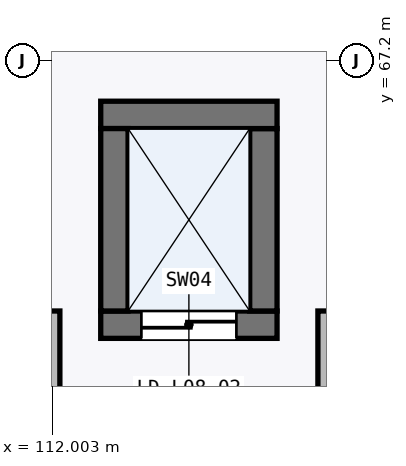
"""IFC4 building model, lengths in metres.
Left out: names, types, materials, properties, quantities, classifications, styles, units other than length and angle.
Written with IfcOpenShell. Run it as: python <this file> out.ifc"""

import sys

from ifc_helpers import new_model, si_unit, direction, frame, frame_2d, origin, place, context, subcontext, project, spatial, rectangle, extrude, element, fill, save


model = new_model("IFC4")
c1 = context("Model", 3, precision=1e-05, world=origin(), true_north=direction((0.0, 1.0)))
c2 = subcontext(c1, "Body", "Model", "MODEL_VIEW")
j1 = project(units=[si_unit("LENGTHUNIT", "METRE"), si_unit("PLANEANGLEUNIT", "RADIAN")], contexts=[c1])
p1 = place(None, origin())
s1 = spatial("IfcSite", under=j1, at=p1, CompositionType="ELEMENT")
p2 = place(p1, origin())
s2 = spatial("IfcBuilding", under=s1, at=p2, CompositionType="ELEMENT")
p3 = place(p2, frame((0.0, 0.0, 36.3)))
s3 = spatial("IfcBuildingStorey", under=s2, at=p3, CompositionType="ELEMENT", Elevation=36.3)
p4 = place(p3, frame((112.64, 63.72, 0.0), z_axis=(0.0, 0.0, 1.0), x_axis=(1.0, 0.0, 0.0)))
e1 = element("IfcWall", 1, at=p4, inside=s3, PredefinedType="SHEAR", context=c2, shape_type="SweptSolid", body=[
    extrude(rectangle(XDim=2.32, YDim=0.36, at=frame_2d((1.16, 0.0))), origin(), (0.0, 0.0, 1.0), 3.495),
])
p5 = place(p4, frame((0.535, 0.0, 0.0)))
e2 = element("IfcOpeningElement", 2, at=p5, cuts=e1, PredefinedType="OPENING", context=c2, shape_type="SweptSolid", body=[
    extrude(rectangle(XDim=1.25, YDim=2.2, at=frame_2d((0.625, 1.1))), frame((0.0, 0.19, 0.0), z_axis=(0.0, -1.0, 0.0), x_axis=(1.0, 0.0, 0.0)), (0.0, 0.0, 1.0), 0.38),
])
p6 = place(p3, frame((114.78, 63.9, 0.0), z_axis=(0.0, 0.0, 1.0), x_axis=(0.0, 1.0, 0.0)))
e3 = element("IfcWall", 3, at=p6, inside=s3, PredefinedType="SHEAR", context=c2, shape_type="SweptSolid", body=[
    extrude(rectangle(XDim=2.4, YDim=0.36, at=frame_2d((1.2, 0.0))), origin(), (0.0, 0.0, 1.0), 3.495),
])
p7 = place(p3, frame((114.96, 66.48, 0.0), z_axis=(0.0, 0.0, 1.0), x_axis=(-1.0, 0.0, 0.0)))
e4 = element("IfcWall", 4, at=p7, inside=s3, PredefinedType="SHEAR", context=c2, shape_type="SweptSolid", body=[
    extrude(rectangle(XDim=2.32, YDim=0.36, at=frame_2d((1.16, 0.0))), origin(), (0.0, 0.0, 1.0), 3.495),
])
p8 = place(p3, frame((112.82, 66.3, 0.0), z_axis=(0.0, 0.0, 1.0), x_axis=(0.0, -1.0, 0.0)))
e5 = element("IfcWall", 5, at=p8, inside=s3, PredefinedType="SHEAR", context=c2, shape_type="SweptSolid", body=[
    extrude(rectangle(XDim=2.4, YDim=0.36, at=frame_2d((1.2, 0.0))), origin(), (0.0, 0.0, 1.0), 3.495),
])
for number, where, z_axis, x_axis in (
    (6, (115.6, 59.397, 0.0), (0.0, 0.0, 1.0), (0.0, 1.0, 0.0)),
    (7, (112.0, 63.9, 0.0), (0.0, 0.0, 1.0), (0.0, -1.0, 0.0)),
):
    element("IfcWall", number, at=place(p3, frame(where, z_axis=z_axis, x_axis=x_axis)), inside=s3, PredefinedType="PARTITIONING", context=c2, shape_type="SweptSolid", body=[
        extrude(rectangle(XDim=4.502, YDim=0.205, at=frame_2d((2.251, 0.0))), origin(), (0.0, 0.0, 1.0), 4.245),
    ])
p9 = place(p5, frame((1.25, 0.0, 0.0), z_axis=(0.0, 0.0, 1.0), x_axis=(-1.0, 0.0, 0.0)))
e8 = element("IfcDoor", 8, at=p9, inside=s3, OperationType="DOUBLE_DOOR_SLIDING", PredefinedType="DOOR", context=c2, shape_type="SweptSolid", body=[
    extrude(rectangle(XDim=1.25, YDim=2.2, at=frame_2d((0.625, 1.1))), frame((0.0, 0.025, 0.0), z_axis=(0.0, -1.0, 0.0), x_axis=(1.0, 0.0, 0.0)), (0.0, 0.0, 1.0), 0.05),
])
fill(e2, e8)
save(model, sys.argv[1])
